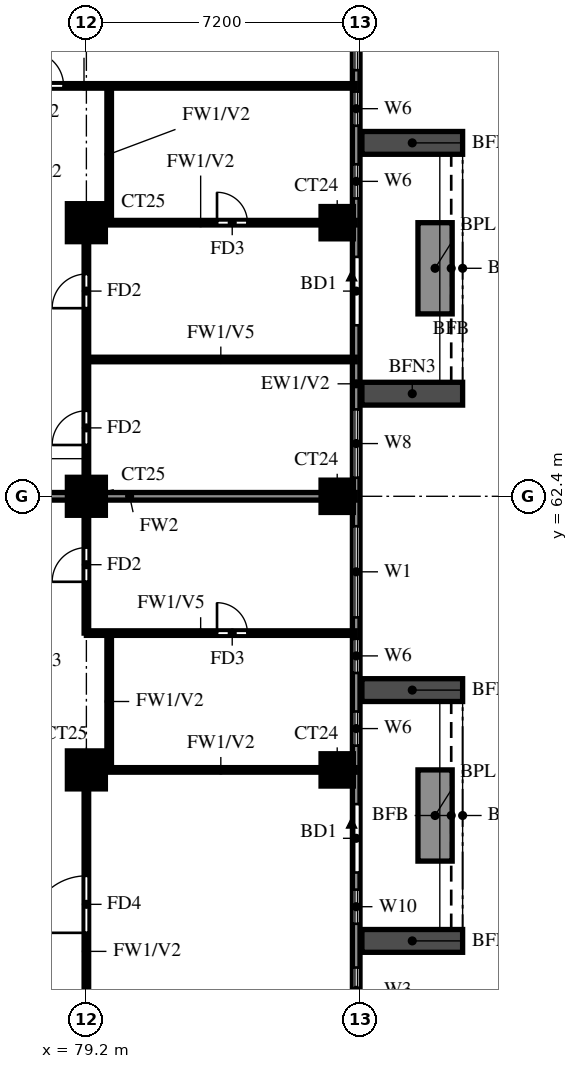
"""IFC4 building model, lengths in metres.
Left out: names, types, materials, properties, quantities, classifications, styles, units other than length and angle.
Written with IfcOpenShell. Run it as: python <this file> out.ifc"""

import sys

from ifc_helpers import new_model, si_unit, direction, frame, frame_2d, origin, origin_2d, place, context, subcontext, project, spatial, rectangle, extrude, source, transform, mapped, element, fill, save


model = new_model("IFC4")
c1 = context("Model", 3, precision=1e-05, world=origin(), true_north=direction((0.0, 1.0)))
c2 = subcontext(c1, "Body", "Model", "MODEL_VIEW")
j1 = project(units=[si_unit("LENGTHUNIT", "METRE"), si_unit("PLANEANGLEUNIT", "RADIAN")], contexts=[c1])
p1 = place(None, origin())
s1 = spatial("IfcSite", under=j1, at=p1, CompositionType="ELEMENT")
p2 = place(p1, origin())
s2 = spatial("IfcBuilding", under=s1, at=p2, CompositionType="ELEMENT")
p3 = place(p2, frame((0.0, 0.0, 167.5)))
s3 = spatial("IfcBuildingStorey", under=s2, at=p3, CompositionType="ELEMENT", Elevation=167.5)
m1 = source(origin(), c2, "Body", "SweptSolid", [
    extrude(rectangle(XDim=1.0, YDim=1.0, at=origin_2d()), origin(), (0.0, 0.0, 1.0), 3.2),
])
p4 = place(p3, frame((79.2, 55.2, 0.0), z_axis=(0.0, 0.0, 1.0), x_axis=(1.0, 0.0, 0.0)))
e1 = element("IfcColumn", 1, at=p4, inside=s3, PredefinedType="COLUMN", context=c2, shape_type="MappedRepresentation", body=[
    mapped(m1, transform((0.0, 0.0, 0.0))),
])
m2 = source(origin(), c2, "Body", "SweptSolid", [
    extrude(rectangle(XDim=0.85, YDim=0.85, at=origin_2d()), origin(), (0.0, 0.0, 1.0), 3.2),
])
p5 = place(p3, frame((85.8, 55.2, 0.0), z_axis=(0.0, 0.0, 1.0), x_axis=(1.0, 0.0, 0.0)))
e2 = element("IfcColumn", 2, at=p5, inside=s3, PredefinedType="COLUMN", context=c2, shape_type="MappedRepresentation", body=[
    mapped(m2, transform((0.0, 0.0, 0.0))),
])
p6 = place(p3, frame((79.2, 62.4, 0.0), z_axis=(0.0, 0.0, 1.0), x_axis=(1.0, 0.0, 0.0)))
e3 = element("IfcColumn", 3, at=p6, inside=s3, PredefinedType="COLUMN", context=c2, shape_type="MappedRepresentation", body=[
    mapped(m1, transform((0.0, 0.0, 0.0))),
])
p7 = place(p3, frame((85.8, 62.4, 0.0), z_axis=(0.0, 0.0, 1.0), x_axis=(1.0, 0.0, 0.0)))
e4 = element("IfcColumn", 4, at=p7, inside=s3, PredefinedType="COLUMN", context=c2, shape_type="MappedRepresentation", body=[
    mapped(m2, transform((0.0, 0.0, 0.0))),
])
p8 = place(p3, frame((79.2, 69.6, 0.0), z_axis=(0.0, 0.0, 1.0), x_axis=(1.0, 0.0, 0.0)))
e5 = element("IfcColumn", 5, at=p8, inside=s3, PredefinedType="COLUMN", context=c2, shape_type="MappedRepresentation", body=[
    mapped(m1, transform((0.0, 0.0, 0.0))),
])
p9 = place(p3, frame((85.8, 69.6, 0.0), z_axis=(0.0, 0.0, 1.0), x_axis=(1.0, 0.0, 0.0)))
e6 = element("IfcColumn", 6, at=p9, inside=s3, PredefinedType="COLUMN", context=c2, shape_type="MappedRepresentation", body=[
    mapped(m2, transform((0.0, 0.0, 0.0))),
])
p10 = place(p3, frame((86.3, 48.2, 0.0), z_axis=(0.0, 0.0, 1.0), x_axis=(0.0, 1.0, 0.0)))
e7 = element("IfcWall", 7, at=p10, inside=s3, PredefinedType="SOLIDWALL", context=c2, shape_type="SweptSolid", body=[
    extrude(rectangle(XDim=28.6, YDim=0.2, at=frame_2d((14.3, 0.0))), origin(), (0.0, 0.0, 1.0), 3.2),
])
p11 = place(p10, frame((4.3, 0.0, 0.0)))
e8 = element("IfcOpeningElement", 8, at=p11, cuts=e7, PredefinedType="OPENING", context=c2, shape_type="SweptSolid", body=[
    extrude(rectangle(XDim=1.8, YDim=2.4, at=frame_2d((0.9, 1.2))), frame((0.0, 0.11, 0.0), z_axis=(0.0, -1.0, 0.0), x_axis=(1.0, 0.0, 0.0)), (0.0, 0.0, 1.0), 0.22),
])
p12 = place(p10, frame((18.7, 0.0, 0.0)))
e9 = element("IfcOpeningElement", 9, at=p12, cuts=e7, PredefinedType="OPENING", context=c2, shape_type="SweptSolid", body=[
    extrude(rectangle(XDim=1.8, YDim=2.4, at=frame_2d((0.9, 1.2))), frame((0.0, 0.11, 0.0), z_axis=(0.0, -1.0, 0.0), x_axis=(1.0, 0.0, 0.0)), (0.0, 0.0, 1.0), 0.22),
])
p13 = place(p10, frame((0.6, 0.0, 0.6)))
e10 = element("IfcOpeningElement", 10, at=p13, cuts=e7, PredefinedType="OPENING", context=c2, shape_type="SweptSolid", body=[
    extrude(rectangle(XDim=1.2, YDim=2.4, at=frame_2d((0.6, 1.2))), frame((0.0, 0.11, 0.0), z_axis=(0.0, -1.0, 0.0), x_axis=(1.0, 0.0, 0.0)), (0.0, 0.0, 1.0), 0.22),
])
p14 = place(p10, frame((2.95, 0.0, 0.6)))
e11 = element("IfcOpeningElement", 11, at=p14, cuts=e7, PredefinedType="OPENING", context=c2, shape_type="SweptSolid", body=[
    extrude(rectangle(XDim=0.9, YDim=2.4, at=frame_2d((0.45, 1.2))), frame((0.0, 0.11, 0.0), z_axis=(0.0, -1.0, 0.0), x_axis=(1.0, 0.0, 0.0)), (0.0, 0.0, 1.0), 0.22),
])
p15 = place(p10, frame((11.012, 0.0, 0.6)))
e12 = element("IfcOpeningElement", 12, at=p15, cuts=e7, PredefinedType="OPENING", context=c2, shape_type="SweptSolid", body=[
    extrude(rectangle(XDim=2.4, YDim=2.4, at=frame_2d((1.2, 1.2))), frame((0.0, 0.11, 0.0), z_axis=(0.0, -1.0, 0.0), x_axis=(1.0, 0.0, 0.0)), (0.0, 0.0, 1.0), 0.22),
])
p16 = place(p10, frame((7.637, 0.0, 1.5)))
e13 = element("IfcOpeningElement", 13, at=p16, cuts=e7, PredefinedType="OPENING", context=c2, shape_type="SweptSolid", body=[
    extrude(rectangle(XDim=0.9, YDim=0.9, at=frame_2d((0.45, 0.45))), frame((0.0, 0.11, 0.0), z_axis=(0.0, -1.0, 0.0), x_axis=(1.0, 0.0, 0.0)), (0.0, 0.0, 1.0), 0.22),
])
p17 = place(p10, frame((9.55, 0.0, 1.5)))
e14 = element("IfcOpeningElement", 14, at=p17, cuts=e7, PredefinedType="OPENING", context=c2, shape_type="SweptSolid", body=[
    extrude(rectangle(XDim=0.9, YDim=0.9, at=frame_2d((0.45, 0.45))), frame((0.0, 0.11, 0.0), z_axis=(0.0, -1.0, 0.0), x_axis=(1.0, 0.0, 0.0)), (0.0, 0.0, 1.0), 0.22),
])
p18 = place(p10, frame((14.688, 0.0, 0.6)))
e15 = element("IfcOpeningElement", 15, at=p18, cuts=e7, PredefinedType="OPENING", context=c2, shape_type="SweptSolid", body=[
    extrude(rectangle(XDim=1.8, YDim=2.4, at=frame_2d((0.9, 1.2))), frame((0.0, 0.11, 0.0), z_axis=(0.0, -1.0, 0.0), x_axis=(1.0, 0.0, 0.0)), (0.0, 0.0, 1.0), 0.22),
])
p19 = place(p10, frame((22.038, 0.0, 1.5)))
e16 = element("IfcOpeningElement", 16, at=p19, cuts=e7, PredefinedType="OPENING", context=c2, shape_type="SweptSolid", body=[
    extrude(rectangle(XDim=0.9, YDim=0.9, at=frame_2d((0.45, 0.45))), frame((0.0, 0.11, 0.0), z_axis=(0.0, -1.0, 0.0), x_axis=(1.0, 0.0, 0.0)), (0.0, 0.0, 1.0), 0.22),
])
p20 = place(p10, frame((23.95, 0.0, 1.5)))
e17 = element("IfcOpeningElement", 17, at=p20, cuts=e7, PredefinedType="OPENING", context=c2, shape_type="SweptSolid", body=[
    extrude(rectangle(XDim=0.9, YDim=0.9, at=frame_2d((0.45, 0.45))), frame((0.0, 0.11, 0.0), z_axis=(0.0, -1.0, 0.0), x_axis=(1.0, 0.0, 0.0)), (0.0, 0.0, 1.0), 0.22),
])
p21 = place(p10, frame((25.413, 0.0, 0.6)))
e18 = element("IfcOpeningElement", 18, at=p21, cuts=e7, PredefinedType="OPENING", context=c2, shape_type="SweptSolid", body=[
    extrude(rectangle(XDim=2.4, YDim=2.4, at=frame_2d((1.2, 1.2))), frame((0.0, 0.11, 0.0), z_axis=(0.0, -1.0, 0.0), x_axis=(1.0, 0.0, 0.0)), (0.0, 0.0, 1.0), 0.22),
])
for number, where, z_axis, x_axis in (
    (19, (86.45, 50.7, 0.0), (0.0, 0.0, 1.0), (1.0, 0.0, 0.0)),
    (20, (86.45, 57.3, 0.0), (0.0, 0.0, 1.0), (1.0, 0.0, 0.0)),
):
    element("IfcWall", number, at=place(p3, frame(where, z_axis=z_axis, x_axis=x_axis)), inside=s3, PredefinedType="SOLIDWALL", context=c2, shape_type="SweptSolid", body=[
        extrude(rectangle(XDim=2.65, YDim=0.6, at=frame_2d((1.325, 0.0))), origin(), (0.0, 0.0, 1.0), 2.85),
    ])
p22 = place(p3, frame((88.375, 52.8, 0.0), z_axis=(0.0, 0.0, 1.0), x_axis=(0.0, 1.0, 0.0)))
e21 = element("IfcWall", 21, at=p22, inside=s3, PredefinedType="SOLIDWALL", context=c2, shape_type="SweptSolid", body=[
    extrude(rectangle(XDim=2.4, YDim=0.9, at=frame_2d((1.2, 0.0))), origin(), (0.0, 0.0, 1.0), 0.9),
])
for number, where, z_axis, x_axis in (
    (22, (86.45, 65.1, 0.0), (0.0, 0.0, 1.0), (1.0, 0.0, 0.0)),
    (23, (86.45, 71.7, 0.0), (0.0, 0.0, 1.0), (1.0, 0.0, 0.0)),
):
    element("IfcWall", number, at=place(p3, frame(where, z_axis=z_axis, x_axis=x_axis)), inside=s3, PredefinedType="SOLIDWALL", context=c2, shape_type="SweptSolid", body=[
        extrude(rectangle(XDim=2.65, YDim=0.6, at=frame_2d((1.325, 0.0))), origin(), (0.0, 0.0, 1.0), 2.85),
    ])
p23 = place(p3, frame((88.375, 67.2, 0.0), z_axis=(0.0, 0.0, 1.0), x_axis=(0.0, 1.0, 0.0)))
e24 = element("IfcWall", 24, at=p23, inside=s3, PredefinedType="SOLIDWALL", context=c2, shape_type="SweptSolid", body=[
    extrude(rectangle(XDim=2.4, YDim=0.9, at=frame_2d((1.2, 0.0))), origin(), (0.0, 0.0, 1.0), 0.9),
])
p24 = place(p3, frame((74.4, 62.4, 0.0), z_axis=(0.0, 0.0, 1.0), x_axis=(1.0, 0.0, 0.0)))
e25 = element("IfcWall", 25, at=p24, inside=s3, PredefinedType="SOLIDWALL", context=c2, shape_type="SweptSolid", body=[
    extrude(rectangle(XDim=11.875, YDim=0.2, at=frame_2d((5.938, 0.0))), origin(), (0.0, 0.0, 1.0), 3.2),
])
p25 = place(p3, frame((79.2, 55.2, 0.0), z_axis=(0.0, 0.0, 1.0), x_axis=(1.0, 0.0, 0.0)))
e26 = element("IfcWall", 26, at=p25, inside=s3, PredefinedType="PARTITIONING", context=c2, shape_type="SweptSolid", body=[
    extrude(rectangle(XDim=7.075, YDim=0.12, at=frame_2d((3.538, 0.0))), origin(), (0.0, 0.0, 1.0), 3.2),
])
p26 = place(p3, frame((79.2, 58.8, 0.0), z_axis=(0.0, 0.0, 1.0), x_axis=(1.0, 0.0, 0.0)))
e27 = element("IfcWall", 27, at=p26, inside=s3, PredefinedType="PARTITIONING", context=c2, shape_type="SweptSolid", body=[
    extrude(rectangle(XDim=7.075, YDim=0.12, at=frame_2d((3.538, 0.0))), origin(), (0.0, 0.0, 1.0), 2.3),
])
p27 = place(p26, frame((3.438, 0.0, 0.0)))
e28 = element("IfcOpeningElement", 28, at=p27, cuts=e27, PredefinedType="OPENING", context=c2, shape_type="SweptSolid", body=[
    extrude(rectangle(XDim=0.8, YDim=2.1, at=frame_2d((0.4, 1.05))), frame((0.0, 0.07, 0.0), z_axis=(0.0, -1.0, 0.0), x_axis=(1.0, 0.0, 0.0)), (0.0, 0.0, 1.0), 0.14),
])
p28 = place(p3, frame((79.2, 66.0, 0.0), z_axis=(0.0, 0.0, 1.0), x_axis=(1.0, 0.0, 0.0)))
e29 = element("IfcWall", 29, at=p28, inside=s3, PredefinedType="PARTITIONING", context=c2, shape_type="SweptSolid", body=[
    extrude(rectangle(XDim=7.075, YDim=0.12, at=frame_2d((3.538, 0.0))), origin(), (0.0, 0.0, 1.0), 2.3),
])
p29 = place(p3, frame((79.2, 69.6, 0.0), z_axis=(0.0, 0.0, 1.0), x_axis=(1.0, 0.0, 0.0)))
e30 = element("IfcWall", 30, at=p29, inside=s3, PredefinedType="PARTITIONING", context=c2, shape_type="SweptSolid", body=[
    extrude(rectangle(XDim=7.075, YDim=0.12, at=frame_2d((3.538, 0.0))), origin(), (0.0, 0.0, 1.0), 3.2),
])
p30 = place(p29, frame((3.438, 0.0, 0.0)))
e31 = element("IfcOpeningElement", 31, at=p30, cuts=e30, PredefinedType="OPENING", context=c2, shape_type="SweptSolid", body=[
    extrude(rectangle(XDim=0.8, YDim=2.1, at=frame_2d((0.4, 1.05))), frame((0.0, 0.07, 0.0), z_axis=(0.0, -1.0, 0.0), x_axis=(1.0, 0.0, 0.0)), (0.0, 0.0, 1.0), 0.14),
])
p31 = place(p3, frame((72.0, 73.2, 0.0), z_axis=(0.0, 0.0, 1.0), x_axis=(1.0, 0.0, 0.0)))
e32 = element("IfcWall", 32, at=p31, inside=s3, PredefinedType="PARTITIONING", context=c2, shape_type="SweptSolid", body=[
    extrude(rectangle(XDim=14.275, YDim=0.12, at=frame_2d((7.137, 0.0))), origin(), (0.0, 0.0, 1.0), 2.3),
])
p32 = place(p31, frame((5.7, 0.0, 0.0)))
e33 = element("IfcOpeningElement", 33, at=p32, cuts=e32, PredefinedType="OPENING", context=c2, shape_type="SweptSolid", body=[
    extrude(rectangle(XDim=0.9, YDim=2.1, at=frame_2d((0.45, 1.05))), frame((0.0, 0.07, 0.0), z_axis=(0.0, -1.0, 0.0), x_axis=(1.0, 0.0, 0.0)), (0.0, 0.0, 1.0), 0.14),
])
p33 = place(p3, frame((79.2, 48.125, 0.0), z_axis=(0.0, 0.0, 1.0), x_axis=(0.0, 1.0, 0.0)))
e34 = element("IfcWall", 34, at=p33, inside=s3, PredefinedType="PARTITIONING", context=c2, shape_type="SweptSolid", body=[
    extrude(rectangle(XDim=7.075, YDim=0.12, at=frame_2d((3.538, 0.0))), origin(), (0.0, 0.0, 1.0), 3.2),
])
p34 = place(p33, frame((2.788, 0.0, 0.0)))
e35 = element("IfcOpeningElement", 35, at=p34, cuts=e34, PredefinedType="OPENING", context=c2, shape_type="SweptSolid", body=[
    extrude(rectangle(XDim=1.5, YDim=2.1, at=frame_2d((0.75, 1.05))), frame((0.0, 0.07, 0.0), z_axis=(0.0, -1.0, 0.0), x_axis=(1.0, 0.0, 0.0)), (0.0, 0.0, 1.0), 0.14),
])
p35 = place(p3, frame((79.2, 58.8, 0.0), z_axis=(0.0, 0.0, 1.0), x_axis=(0.0, 1.0, 0.0)))
e36 = element("IfcWall", 36, at=p35, inside=s3, PredefinedType="PARTITIONING", context=c2, shape_type="SweptSolid", body=[
    extrude(rectangle(XDim=10.8, YDim=0.12, at=frame_2d((5.4, 0.0))), origin(), (0.0, 0.0, 1.0), 3.2),
])
p36 = place(p35, frame((1.35, 0.0, 0.0)))
e37 = element("IfcOpeningElement", 37, at=p36, cuts=e36, PredefinedType="OPENING", context=c2, shape_type="SweptSolid", body=[
    extrude(rectangle(XDim=0.9, YDim=2.1, at=frame_2d((0.45, 1.05))), frame((0.0, 0.07, 0.0), z_axis=(0.0, -1.0, 0.0), x_axis=(1.0, 0.0, 0.0)), (0.0, 0.0, 1.0), 0.14),
])
p37 = place(p35, frame((4.95, 0.0, 0.0)))
e38 = element("IfcOpeningElement", 38, at=p37, cuts=e36, PredefinedType="OPENING", context=c2, shape_type="SweptSolid", body=[
    extrude(rectangle(XDim=0.9, YDim=2.1, at=frame_2d((0.45, 1.05))), frame((0.0, 0.07, 0.0), z_axis=(0.0, -1.0, 0.0), x_axis=(1.0, 0.0, 0.0)), (0.0, 0.0, 1.0), 0.14),
])
p38 = place(p35, frame((8.55, 0.0, 0.0)))
e39 = element("IfcOpeningElement", 39, at=p38, cuts=e36, PredefinedType="OPENING", context=c2, shape_type="SweptSolid", body=[
    extrude(rectangle(XDim=0.9, YDim=2.1, at=frame_2d((0.45, 1.05))), frame((0.0, 0.07, 0.0), z_axis=(0.0, -1.0, 0.0), x_axis=(1.0, 0.0, 0.0)), (0.0, 0.0, 1.0), 0.14),
])
p39 = place(p3, frame((79.8, 55.2, 0.0), z_axis=(0.0, 0.0, 1.0), x_axis=(0.0, 1.0, 0.0)))
e40 = element("IfcWall", 40, at=p39, inside=s3, PredefinedType="PARTITIONING", context=c2, shape_type="SweptSolid", body=[
    extrude(rectangle(XDim=3.6, YDim=0.12, at=frame_2d((1.8, 0.0))), origin(), (0.0, 0.0, 1.0), 3.2),
])
p40 = place(p3, frame((79.8, 69.6, 0.0), z_axis=(0.0, 0.0, 1.0), x_axis=(0.0, 1.0, 0.0)))
e41 = element("IfcWall", 41, at=p40, inside=s3, PredefinedType="PARTITIONING", context=c2, shape_type="SweptSolid", body=[
    extrude(rectangle(XDim=3.6, YDim=0.12, at=frame_2d((1.8, 0.0))), origin(), (0.0, 0.0, 1.0), 3.2),
])
p41 = place(p11, origin())
e42 = element("IfcDoor", 42, at=p41, inside=s3, OperationType="DOUBLE_DOOR_SLIDING", PredefinedType="DOOR", context=c2, shape_type="SweptSolid", body=[
    extrude(rectangle(XDim=1.8, YDim=2.4, at=frame_2d((0.9, 1.2))), frame((0.0, 0.025, 0.0), z_axis=(0.0, -1.0, 0.0), x_axis=(1.0, 0.0, 0.0)), (0.0, 0.0, 1.0), 0.05),
])
fill(e8, e42)
p42 = place(p12, origin())
e43 = element("IfcDoor", 43, at=p42, inside=s3, OperationType="DOUBLE_DOOR_SLIDING", PredefinedType="DOOR", context=c2, shape_type="SweptSolid", body=[
    extrude(rectangle(XDim=1.8, YDim=2.4, at=frame_2d((0.9, 1.2))), frame((0.0, 0.025, 0.0), z_axis=(0.0, -1.0, 0.0), x_axis=(1.0, 0.0, 0.0)), (0.0, 0.0, 1.0), 0.05),
])
fill(e9, e43)
p43 = place(p13, origin())
e44 = element("IfcWindow", 44, at=p43, inside=s3, PartitioningType="SINGLE_PANEL", PredefinedType="WINDOW", context=c2, shape_type="SweptSolid", body=[
    extrude(rectangle(XDim=1.2, YDim=2.4, at=frame_2d((0.6, 1.2))), frame((0.0, 0.03, 0.0), z_axis=(0.0, -1.0, 0.0), x_axis=(1.0, 0.0, 0.0)), (0.0, 0.0, 1.0), 0.06),
])
fill(e10, e44)
p44 = place(p14, origin())
e45 = element("IfcWindow", 45, at=p44, inside=s3, PartitioningType="SINGLE_PANEL", PredefinedType="WINDOW", context=c2, shape_type="SweptSolid", body=[
    extrude(rectangle(XDim=0.9, YDim=2.4, at=frame_2d((0.45, 1.2))), frame((0.0, 0.03, 0.0), z_axis=(0.0, -1.0, 0.0), x_axis=(1.0, 0.0, 0.0)), (0.0, 0.0, 1.0), 0.06),
])
fill(e11, e45)
p45 = place(p15, origin())
e46 = element("IfcWindow", 46, at=p45, inside=s3, PartitioningType="DOUBLE_PANEL_VERTICAL", PredefinedType="WINDOW", context=c2, shape_type="SweptSolid", body=[
    extrude(rectangle(XDim=2.4, YDim=2.4, at=frame_2d((1.2, 1.2))), frame((0.0, 0.03, 0.0), z_axis=(0.0, -1.0, 0.0), x_axis=(1.0, 0.0, 0.0)), (0.0, 0.0, 1.0), 0.06),
])
fill(e12, e46)
p46 = place(p16, origin())
e47 = element("IfcWindow", 47, at=p46, inside=s3, PartitioningType="SINGLE_PANEL", PredefinedType="WINDOW", context=c2, shape_type="SweptSolid", body=[
    extrude(rectangle(XDim=0.9, YDim=0.9, at=frame_2d((0.45, 0.45))), frame((0.0, 0.03, 0.0), z_axis=(0.0, -1.0, 0.0), x_axis=(1.0, 0.0, 0.0)), (0.0, 0.0, 1.0), 0.06),
])
fill(e13, e47)
p47 = place(p17, origin())
e48 = element("IfcWindow", 48, at=p47, inside=s3, PartitioningType="SINGLE_PANEL", PredefinedType="WINDOW", context=c2, shape_type="SweptSolid", body=[
    extrude(rectangle(XDim=0.9, YDim=0.9, at=frame_2d((0.45, 0.45))), frame((0.0, 0.03, 0.0), z_axis=(0.0, -1.0, 0.0), x_axis=(1.0, 0.0, 0.0)), (0.0, 0.0, 1.0), 0.06),
])
fill(e14, e48)
p48 = place(p18, origin())
e49 = element("IfcWindow", 49, at=p48, inside=s3, PartitioningType="DOUBLE_PANEL_VERTICAL", PredefinedType="WINDOW", context=c2, shape_type="SweptSolid", body=[
    extrude(rectangle(XDim=1.8, YDim=2.4, at=frame_2d((0.9, 1.2))), frame((0.0, 0.03, 0.0), z_axis=(0.0, -1.0, 0.0), x_axis=(1.0, 0.0, 0.0)), (0.0, 0.0, 1.0), 0.06),
])
fill(e15, e49)
p49 = place(p19, origin())
e50 = element("IfcWindow", 50, at=p49, inside=s3, PartitioningType="SINGLE_PANEL", PredefinedType="WINDOW", context=c2, shape_type="SweptSolid", body=[
    extrude(rectangle(XDim=0.9, YDim=0.9, at=frame_2d((0.45, 0.45))), frame((0.0, 0.03, 0.0), z_axis=(0.0, -1.0, 0.0), x_axis=(1.0, 0.0, 0.0)), (0.0, 0.0, 1.0), 0.06),
])
fill(e16, e50)
p50 = place(p20, origin())
e51 = element("IfcWindow", 51, at=p50, inside=s3, PartitioningType="SINGLE_PANEL", PredefinedType="WINDOW", context=c2, shape_type="SweptSolid", body=[
    extrude(rectangle(XDim=0.9, YDim=0.9, at=frame_2d((0.45, 0.45))), frame((0.0, 0.03, 0.0), z_axis=(0.0, -1.0, 0.0), x_axis=(1.0, 0.0, 0.0)), (0.0, 0.0, 1.0), 0.06),
])
fill(e17, e51)
p51 = place(p21, origin())
e52 = element("IfcWindow", 52, at=p51, inside=s3, PartitioningType="DOUBLE_PANEL_VERTICAL", PredefinedType="WINDOW", context=c2, shape_type="SweptSolid", body=[
    extrude(rectangle(XDim=2.4, YDim=2.4, at=frame_2d((1.2, 1.2))), frame((0.0, 0.03, 0.0), z_axis=(0.0, -1.0, 0.0), x_axis=(1.0, 0.0, 0.0)), (0.0, 0.0, 1.0), 0.06),
])
fill(e18, e52)
p52 = place(p34, origin())
e53 = element("IfcDoor", 53, at=p52, inside=s3, OperationType="SINGLE_SWING_RIGHT", PredefinedType="DOOR", context=c2, shape_type="SweptSolid", body=[
    extrude(rectangle(XDim=1.5, YDim=2.1, at=frame_2d((0.75, 1.05))), frame((0.0, 0.025, 0.0), z_axis=(0.0, -1.0, 0.0), x_axis=(1.0, 0.0, 0.0)), (0.0, 0.0, 1.0), 0.05),
])
fill(e35, e53)
p53 = place(p36, origin())
e54 = element("IfcDoor", 54, at=p53, inside=s3, OperationType="SINGLE_SWING_LEFT", PredefinedType="DOOR", context=c2, shape_type="SweptSolid", body=[
    extrude(rectangle(XDim=0.9, YDim=2.1, at=frame_2d((0.45, 1.05))), frame((0.0, 0.025, 0.0), z_axis=(0.0, -1.0, 0.0), x_axis=(1.0, 0.0, 0.0)), (0.0, 0.0, 1.0), 0.05),
])
fill(e37, e54)
p54 = place(p27, origin())
e55 = element("IfcDoor", 55, at=p54, inside=s3, OperationType="SINGLE_SWING_LEFT", PredefinedType="DOOR", context=c2, shape_type="SweptSolid", body=[
    extrude(rectangle(XDim=0.8, YDim=2.1, at=frame_2d((0.4, 1.05))), frame((0.0, 0.025, 0.0), z_axis=(0.0, -1.0, 0.0), x_axis=(1.0, 0.0, 0.0)), (0.0, 0.0, 1.0), 0.05),
])
fill(e28, e55)
p55 = place(p37, origin())
e56 = element("IfcDoor", 56, at=p55, inside=s3, OperationType="SINGLE_SWING_RIGHT", PredefinedType="DOOR", context=c2, shape_type="SweptSolid", body=[
    extrude(rectangle(XDim=0.9, YDim=2.1, at=frame_2d((0.45, 1.05))), frame((0.0, 0.025, 0.0), z_axis=(0.0, -1.0, 0.0), x_axis=(1.0, 0.0, 0.0)), (0.0, 0.0, 1.0), 0.05),
])
fill(e38, e56)
p56 = place(p38, origin())
e57 = element("IfcDoor", 57, at=p56, inside=s3, OperationType="SINGLE_SWING_LEFT", PredefinedType="DOOR", context=c2, shape_type="SweptSolid", body=[
    extrude(rectangle(XDim=0.9, YDim=2.1, at=frame_2d((0.45, 1.05))), frame((0.0, 0.025, 0.0), z_axis=(0.0, -1.0, 0.0), x_axis=(1.0, 0.0, 0.0)), (0.0, 0.0, 1.0), 0.05),
])
fill(e39, e57)
p57 = place(p30, origin())
e58 = element("IfcDoor", 58, at=p57, inside=s3, OperationType="SINGLE_SWING_LEFT", PredefinedType="DOOR", context=c2, shape_type="SweptSolid", body=[
    extrude(rectangle(XDim=0.8, YDim=2.1, at=frame_2d((0.4, 1.05))), frame((0.0, 0.025, 0.0), z_axis=(0.0, -1.0, 0.0), x_axis=(1.0, 0.0, 0.0)), (0.0, 0.0, 1.0), 0.05),
])
fill(e31, e58)
p58 = place(p32, origin())
e59 = element("IfcDoor", 59, at=p58, inside=s3, OperationType="SINGLE_SWING_RIGHT", PredefinedType="DOOR", context=c2, shape_type="SweptSolid", body=[
    extrude(rectangle(XDim=0.9, YDim=2.1, at=frame_2d((0.45, 1.05))), frame((0.0, 0.025, 0.0), z_axis=(0.0, -1.0, 0.0), x_axis=(1.0, 0.0, 0.0)), (0.0, 0.0, 1.0), 0.05),
])
fill(e33, e59)
save(model, sys.argv[1])
